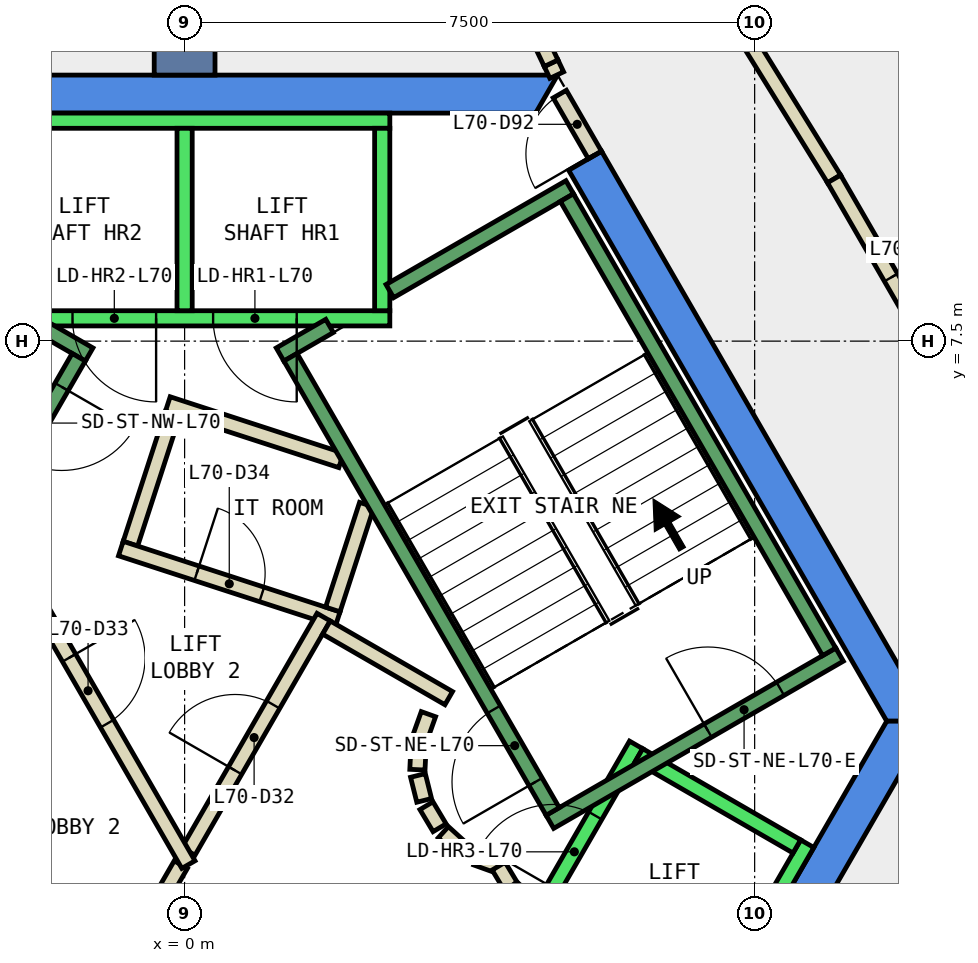
"""IFC4 building model, lengths in metres.
Left out: names, types, materials, properties, quantities, classifications, styles, units other than length and angle.
Written with IfcOpenShell. Run it as: python <this file> out.ifc"""

import sys

from ifc_helpers import new_model, si_unit, direction, frame, frame_2d, origin, place, context, subcontext, project, spatial, polyline, rectangle, outline, extrude, element, fill, save


model = new_model("IFC4")
c1 = context("Model", 3, precision=1e-05, world=origin(), true_north=direction((0.0, 1.0)))
c2 = subcontext(c1, "Body", "Model", "MODEL_VIEW")
j1 = project(units=[si_unit("LENGTHUNIT", "METRE"), si_unit("PLANEANGLEUNIT", "RADIAN")], contexts=[c1])
p1 = place(None, origin())
s1 = spatial("IfcSite", under=j1, at=p1, CompositionType="ELEMENT")
p2 = place(p1, origin())
s2 = spatial("IfcBuilding", under=s1, at=p2, CompositionType="ELEMENT")
p3 = place(p2, frame((0.0, 0.0, 300.8)))
s3 = spatial("IfcBuildingStorey", under=s2, at=p3, CompositionType="ELEMENT", Elevation=300.8)
p4 = place(p3, frame((0.0, 0.0, -0.34)))
e1 = element("IfcWall", 1, at=p4, inside=s3, PredefinedType="SHEAR", context=c2, shape_type="SweptSolid", body=[
    extrude(outline(polyline([(5.486, 9.998), (5.053, 9.748), (9.238, 2.5), (9.815, 2.5), (5.486, 9.998)])), origin(), (0.0, 0.0, 1.0), 3.6),
])
p5 = place(p3, frame((0.0, 0.0, -0.34)))
e2 = element("IfcWall", 2, at=p5, inside=s3, PredefinedType="SHEAR", context=c2, shape_type="SweptSolid", body=[
    extrude(outline(polyline([(4.907, 11.0), (-4.907, 11.0), (-4.619, 10.5), (4.619, 10.5), (4.907, 11.0)])), origin(), (0.0, 0.0, 1.0), 3.6),
])
p6 = place(p3, frame((0.0, 0.0, -0.34)))
e3 = element("IfcWall", 3, at=p6, inside=s3, PredefinedType="SHEAR", context=c2, shape_type="SweptSolid", body=[
    extrude(outline(polyline([(4.907, -6.0), (9.815, 2.5), (9.238, 2.5), (4.619, -5.5), (4.907, -6.0)])), origin(), (0.0, 0.0, 1.0), 3.6),
])
p7 = place(p3, frame((0.0, 11.0, -0.34), z_axis=(0.0, 0.0, 1.0), x_axis=(0.0, 1.0, 0.0)))
e4 = element("IfcWall", 4, at=p7, inside=s3, PredefinedType="SHEAR", context=c2, shape_type="SweptSolid", body=[
    extrude(rectangle(XDim=9.0, YDim=0.8, at=frame_2d((4.5, 0.0))), origin(), (0.0, 0.0, 1.0), 3.6),
])
p8 = place(p3, frame((2.06, 5.931, 0.0), z_axis=(0.0, 0.0, 1.0), x_axis=(-0.95092855133, 0.309410552932, 0.0)))
e5 = element("IfcWall", 5, at=p8, inside=s3, PredefinedType="PARTITIONING", context=c2, shape_type="SweptSolid", body=[
    extrude(rectangle(XDim=2.399, YDim=0.2, at=frame_2d((1.199, 0.0))), origin(), (0.0, 0.0, 1.0), 3.26),
])
p9 = place(p3, frame((-0.157, 6.547, 0.0), z_axis=(0.0, 0.0, 1.0), x_axis=(-0.308813127339, -0.951122732555, 0.0)))
e6 = element("IfcWall", 6, at=p9, inside=s3, PredefinedType="PARTITIONING", context=c2, shape_type="SweptSolid", body=[
    extrude(rectangle(XDim=1.8, YDim=0.2, at=frame_2d((0.9, 0.0))), origin(), (0.0, 0.0, 1.0), 3.26),
])
p10 = place(p3, frame((-0.839, 4.771, 0.0), z_axis=(0.0, 0.0, 1.0), x_axis=(0.950961084355, -0.309310549515, 0.0)))
e7 = element("IfcWall", 7, at=p10, inside=s3, PredefinedType="PARTITIONING", context=c2, shape_type="SweptSolid", body=[
    extrude(rectangle(XDim=3.0, YDim=0.2, at=frame_2d((1.5, 0.0))), origin(), (0.0, 0.0, 1.0), 3.26),
])
p11 = place(p10, frame((1.05, 0.0, 0.0)))
e8 = element("IfcOpeningElement", 8, at=p11, cuts=e7, PredefinedType="OPENING", context=c2, shape_type="SweptSolid", body=[
    extrude(rectangle(XDim=0.9, YDim=2.1, at=frame_2d((0.45, 1.05))), frame((0.0, 0.11, 0.0), z_axis=(0.0, -1.0, 0.0), x_axis=(1.0, 0.0, 0.0)), (0.0, 0.0, 1.0), 0.22),
])
p12 = place(p3, frame((1.95, 3.97, 0.0), z_axis=(0.0, 0.0, 1.0), x_axis=(0.308583003896, 0.951197418892, 0.0)))
e9 = element("IfcWall", 9, at=p12, inside=s3, PredefinedType="PARTITIONING", context=c2, shape_type="SweptSolid", body=[
    extrude(rectangle(XDim=1.449, YDim=0.2, at=frame_2d((0.724, 0.0))), origin(), (0.0, 0.0, 1.0), 3.26),
])
p13 = place(p3, frame((4.896, 11.0, 0.0), z_axis=(0.0, 0.0, 1.0), x_axis=(-0.428451014387, 0.903565010539, 0.0)))
e10 = element("IfcWall", 10, at=p13, inside=s3, PredefinedType="PARTITIONING", context=c2, shape_type="SweptSolid", body=[
    extrude(rectangle(XDim=0.173, YDim=0.2, at=frame_2d((0.086, 0.0))), origin(), (0.0, 0.0, 1.0), 2.4),
])
p14 = place(p3, frame((6.683, 12.642, 0.0), z_axis=(0.0, 0.0, 1.0), x_axis=(0.526290465295, -0.850304854825, 0.0)))
e11 = element("IfcWall", 11, at=p14, inside=s3, PredefinedType="PARTITIONING", context=c2, shape_type="SweptSolid", body=[
    extrude(rectangle(XDim=3.538, YDim=0.2, at=frame_2d((1.769, 0.0))), origin(), (0.0, 0.0, 1.0), 3.26),
])
p15 = place(p3, frame((8.545, 9.634, 0.0), z_axis=(0.0, 0.0, 1.0), x_axis=(0.50008212199, -0.86597798544, 0.0)))
e12 = element("IfcWall", 12, at=p15, inside=s3, PredefinedType="PARTITIONING", context=c2, shape_type="SweptSolid", body=[
    extrude(rectangle(XDim=3.995, YDim=0.2, at=frame_2d((1.998, 0.0))), origin(), (0.0, 0.0, 1.0), 3.26),
])
p16 = place(p15, frame((1.498, 0.0, 0.0)))
e13 = element("IfcOpeningElement", 13, at=p16, cuts=e12, PredefinedType="OPENING", context=c2, shape_type="SweptSolid", body=[
    extrude(rectangle(XDim=1.0, YDim=2.1, at=frame_2d((0.5, 1.05))), frame((0.0, 0.11, 0.0), z_axis=(0.0, -1.0, 0.0), x_axis=(1.0, 0.0, 0.0)), (0.0, 0.0, 1.0), 0.22),
])
p17 = place(p3, frame((-0.982, -1.0, 0.0), z_axis=(0.0, 0.0, 1.0), x_axis=(0.50024047865, 0.865886518847, 0.0)))
e14 = element("IfcWall", 14, at=p17, inside=s3, PredefinedType="PARTITIONING", context=c2, shape_type="SweptSolid", body=[
    extrude(rectangle(XDim=1.863, YDim=0.2, at=frame_2d((0.931, 0.0))), origin(), (0.0, 0.0, 1.0), 3.26),
])
p18 = place(p3, frame((0.05, 0.787, 0.0), z_axis=(0.0, 0.0, 1.0), x_axis=(0.499954076797, 0.866051915934, 0.0)))
e15 = element("IfcWall", 15, at=p18, inside=s3, PredefinedType="PARTITIONING", context=c2, shape_type="SweptSolid", body=[
    extrude(rectangle(XDim=3.558, YDim=0.2, at=frame_2d((1.779, 0.0))), origin(), (0.0, 0.0, 1.0), 3.26),
])
p19 = place(p18, frame((1.229, 0.0, 0.0)))
e16 = element("IfcOpeningElement", 16, at=p19, cuts=e15, PredefinedType="OPENING", context=c2, shape_type="SweptSolid", body=[
    extrude(rectangle(XDim=1.0, YDim=2.1, at=frame_2d((0.5, 1.05))), frame((0.0, 0.11, 0.0), z_axis=(0.0, -1.0, 0.0), x_axis=(1.0, 0.0, 0.0)), (0.0, 0.0, 1.0), 0.22),
])
p20 = place(p3, frame((1.866, 3.732, 0.0), z_axis=(0.0, 0.0, 1.0), x_axis=(0.866043361281, -0.499968895414, 0.0)))
e17 = element("IfcWall", 17, at=p20, inside=s3, PredefinedType="PARTITIONING", context=c2, shape_type="SweptSolid", body=[
    extrude(rectangle(XDim=1.858, YDim=0.2, at=frame_2d((0.929, 0.0))), origin(), (0.0, 0.0, 1.0), 3.26),
])
p21 = place(p3, frame((3.208, 2.592, 0.0), z_axis=(0.0, 0.0, 1.0), x_axis=(-0.337388820924, -0.941365382578, 0.0)))
e18 = element("IfcWall", 18, at=p21, inside=s3, PredefinedType="PARTITIONING", context=c2, shape_type="SweptSolid", body=[
    extrude(rectangle(XDim=0.338, YDim=0.2, at=frame_2d((0.169, 0.0))), origin(), (0.0, 0.0, 1.0), 3.26),
])
p22 = place(p3, frame((3.079, 2.199, 0.0), z_axis=(0.0, 0.0, 1.0), x_axis=(-0.047771483479, -0.998858290933, 0.0)))
e19 = element("IfcWall", 19, at=p22, inside=s3, PredefinedType="PARTITIONING", context=c2, shape_type="SweptSolid", body=[
    extrude(rectangle(XDim=0.337, YDim=0.2, at=frame_2d((0.169, 0.0))), origin(), (0.0, 0.0, 1.0), 3.26),
])
p23 = place(p3, frame((3.07, 1.786, 0.0), z_axis=(0.0, 0.0, 1.0), x_axis=(0.242705583207, -0.970099994784, 0.0)))
e20 = element("IfcWall", 20, at=p23, inside=s3, PredefinedType="PARTITIONING", context=c2, shape_type="SweptSolid", body=[
    extrude(rectangle(XDim=0.338, YDim=0.2, at=frame_2d((0.169, 0.0))), origin(), (0.0, 0.0, 1.0), 3.26),
])
for number, where, z_axis, x_axis in (
    (21, (3.182, 1.388, 0.0), (0.0, 0.0, 1.0), (0.512, -0.859, 0.0)),
    (22, (3.404, 1.039, 0.0), (0.0, 0.0, 1.0), (0.74, -0.672, 0.0)),
):
    element("IfcWall", number, at=place(p3, frame(where, z_axis=z_axis, x_axis=x_axis)), inside=s3, PredefinedType="PARTITIONING", context=c2, shape_type="SweptSolid", body=[
        extrude(rectangle(XDim=0.338, YDim=0.2, at=frame_2d((0.169, 0.0))), origin(), (0.0, 0.0, 1.0), 3.26),
    ])
p24 = place(p3, frame((3.838, 0.702, 0.0), z_axis=(0.0, 0.0, 1.0), x_axis=(0.941035081519, -0.338308993895, 0.0)))
e23 = element("IfcWall", 23, at=p24, inside=s3, PredefinedType="PARTITIONING", context=c2, shape_type="SweptSolid", body=[
    extrude(rectangle(XDim=0.337, YDim=0.2, at=frame_2d((0.168, 0.0))), origin(), (0.0, 0.0, 1.0), 3.26),
])
p25 = place(p3, frame((4.132, 0.593, 0.0), z_axis=(0.0, 0.0, 1.0), x_axis=(0.513561617048, -0.858052717201, 0.0)))
e24 = element("IfcWall", 24, at=p25, inside=s3, PredefinedType="PARTITIONING", context=c2, shape_type="SweptSolid", body=[
    extrude(rectangle(XDim=0.308, YDim=0.2, at=frame_2d((0.154, 0.0))), origin(), (0.0, 0.0, 1.0), 3.26),
])
p26 = place(p3, frame((4.301, 0.315, 0.0), z_axis=(0.0, 0.0, 1.0), x_axis=(0.741798017506, -0.670623367639, 0.0)))
e25 = element("IfcWall", 25, at=p26, inside=s3, PredefinedType="PARTITIONING", context=c2, shape_type="SweptSolid", body=[
    extrude(rectangle(XDim=0.309, YDim=0.2, at=frame_2d((0.154, 0.0))), origin(), (0.0, 0.0, 1.0), 3.26),
])
p27 = place(p3, frame((-2.54, 5.1, 0.0), z_axis=(0.0, 0.0, 1.0), x_axis=(0.499925051871, -0.866068670783, 0.0)))
e26 = element("IfcWall", 26, at=p27, inside=s3, PredefinedType="PARTITIONING", context=c2, shape_type="SweptSolid", body=[
    extrude(rectangle(XDim=5.181, YDim=0.2, at=frame_2d((2.59, 0.0))), origin(), (0.0, 0.0, 1.0), 3.26),
])
p28 = place(p27, frame((2.04, 0.0, 0.0)))
e27 = element("IfcOpeningElement", 27, at=p28, cuts=e26, PredefinedType="OPENING", context=c2, shape_type="SweptSolid", body=[
    extrude(rectangle(XDim=1.0, YDim=2.1, at=frame_2d((0.5, 1.05))), frame((0.0, 0.11, 0.0), z_axis=(0.0, -1.0, 0.0), x_axis=(1.0, 0.0, 0.0)), (0.0, 0.0, 1.0), 0.22),
])
p29 = place(p3, frame((5.399, 9.948, 0.0), z_axis=(0.0, 0.0, 1.0), x_axis=(-0.499882215713, 0.866093395895, 0.0)))
e28 = element("IfcWall", 28, at=p29, inside=s3, PredefinedType="PARTITIONING", context=c2, shape_type="SweptSolid", body=[
    extrude(rectangle(XDim=0.926, YDim=0.2, at=frame_2d((0.463, 0.0))), origin(), (0.0, 0.0, 1.0), 2.4),
])
p30 = place(p29, frame((0.017, 0.0, 0.0)))
e29 = element("IfcOpeningElement", 29, at=p30, cuts=e28, PredefinedType="OPENING", context=c2, shape_type="SweptSolid", body=[
    extrude(rectangle(XDim=0.9, YDim=2.1, at=frame_2d((0.45, 1.05))), frame((0.0, 0.11, 0.0), z_axis=(0.0, -1.0, 0.0), x_axis=(1.0, 0.0, 0.0)), (0.0, 0.0, 1.0), 0.22),
])
p31 = place(p3, frame((4.822, 11.156, 0.0), z_axis=(0.0, 0.0, 1.0), x_axis=(-0.429057973289, 0.903276953961, 0.0)))
e30 = element("IfcWall", 30, at=p31, inside=s3, PredefinedType="PARTITIONING", context=c2, shape_type="SweptSolid", body=[
    extrude(rectangle(XDim=4.298, YDim=0.2, at=frame_2d((2.149, 0.0))), origin(), (0.0, 0.0, 1.0), 3.26),
])
p32 = place(p3, frame((2.7, 7.8, 0.0), z_axis=(0.0, 0.0, 1.0), x_axis=(-1.0, 0.0, 0.0)))
e31 = element("IfcWall", 31, at=p32, inside=s3, PredefinedType="STANDARD", context=c2, shape_type="SweptSolid", body=[
    extrude(rectangle(XDim=5.4, YDim=0.2, at=frame_2d((2.7, 0.0))), origin(), (0.0, 0.0, 1.0), 3.26),
])
p33 = place(p32, frame((1.225, 0.0, 0.0)))
e32 = element("IfcOpeningElement", 32, at=p33, cuts=e31, PredefinedType="OPENING", context=c2, shape_type="SweptSolid", body=[
    extrude(rectangle(XDim=1.1, YDim=2.1, at=frame_2d((0.55, 1.05))), frame((0.0, 0.11, 0.0), z_axis=(0.0, -1.0, 0.0), x_axis=(1.0, 0.0, 0.0)), (0.0, 0.0, 1.0), 0.22),
])
p34 = place(p32, frame((3.075, 0.0, 0.0)))
e33 = element("IfcOpeningElement", 33, at=p34, cuts=e31, PredefinedType="OPENING", context=c2, shape_type="SweptSolid", body=[
    extrude(rectangle(XDim=1.1, YDim=2.1, at=frame_2d((0.55, 1.05))), frame((0.0, 0.11, 0.0), z_axis=(0.0, -1.0, 0.0), x_axis=(1.0, 0.0, 0.0)), (0.0, 0.0, 1.0), 0.22),
])
p35 = place(p3, frame((2.7, 10.4, 0.0), z_axis=(0.0, 0.0, 1.0), x_axis=(-1.0, 0.0, 0.0)))
e34 = element("IfcWall", 34, at=p35, inside=s3, PredefinedType="STANDARD", context=c2, shape_type="SweptSolid", body=[
    extrude(rectangle(XDim=5.4, YDim=0.2, at=frame_2d((2.7, 0.0))), origin(), (0.0, 0.0, 1.0), 3.26),
])
for number, where, z_axis, x_axis in (
    (35, (2.6, 7.9, 0.0), (0.0, 0.0, 1.0), (0.0, 1.0, 0.0)),
    (36, (0.0, 7.9, 0.0), (0.0, 0.0, 1.0), (0.0, 1.0, 0.0)),
):
    element("IfcWall", number, at=place(p3, frame(where, z_axis=z_axis, x_axis=x_axis)), inside=s3, PredefinedType="STANDARD", context=c2, shape_type="SweptSolid", body=[
        extrude(rectangle(XDim=2.4, YDim=0.2, at=frame_2d((1.2, 0.0))), origin(), (0.0, 0.0, 1.0), 3.26),
    ])
p36 = place(p3, frame((3.24, -2.488, 0.0), z_axis=(0.0, 0.0, 1.0), x_axis=(0.500034260056, 0.866005622828, 0.0)))
e37 = element("IfcWall", 37, at=p36, inside=s3, PredefinedType="STANDARD", context=c2, shape_type="SweptSolid", body=[
    extrude(rectangle(XDim=5.399, YDim=0.2, at=frame_2d((2.7, 0.0))), origin(), (0.0, 0.0, 1.0), 3.26),
])
p37 = place(p36, frame((3.225, 0.0, 0.0)))
e38 = element("IfcOpeningElement", 38, at=p37, cuts=e37, PredefinedType="OPENING", context=c2, shape_type="SweptSolid", body=[
    extrude(rectangle(XDim=1.1, YDim=2.1, at=frame_2d((0.55, 1.05))), frame((0.0, 0.11, 0.0), z_axis=(0.0, -1.0, 0.0), x_axis=(1.0, 0.0, 0.0)), (0.0, 0.0, 1.0), 0.22),
])
p38 = place(p36, frame((1.225, 0.0, 0.0)))
e39 = element("IfcOpeningElement", 39, at=p38, cuts=e37, PredefinedType="OPENING", context=c2, shape_type="SweptSolid", body=[
    extrude(rectangle(XDim=1.1, YDim=2.1, at=frame_2d((0.55, 1.05))), frame((0.0, 0.11, 0.0), z_axis=(0.0, -1.0, 0.0), x_axis=(1.0, 0.0, 0.0)), (0.0, 0.0, 1.0), 0.22),
])
p39 = place(p3, frame((5.492, -3.788, 0.0), z_axis=(0.0, 0.0, 1.0), x_axis=(0.500034260056, 0.866005622828, 0.0)))
e40 = element("IfcWall", 40, at=p39, inside=s3, PredefinedType="STANDARD", context=c2, shape_type="SweptSolid", body=[
    extrude(rectangle(XDim=5.399, YDim=0.2, at=frame_2d((2.7, 0.0))), origin(), (0.0, 0.0, 1.0), 3.26),
])
p40 = place(p3, frame((5.977, 2.052, 0.0), z_axis=(0.0, 0.0, 1.0), x_axis=(0.865973769406, -0.500089422704, 0.0)))
e41 = element("IfcWall", 41, at=p40, inside=s3, PredefinedType="STANDARD", context=c2, shape_type="SweptSolid", body=[
    extrude(rectangle(XDim=2.399, YDim=0.2, at=frame_2d((1.2, 0.0))), origin(), (0.0, 0.0, 1.0), 3.26),
])
p41 = place(p3, frame((4.806, 1.176, 0.0), z_axis=(0.0, 0.0, 1.0), x_axis=(0.866059941101, 0.499940174841, 0.0)))
e42 = element("IfcWall", 42, at=p41, inside=s3, PredefinedType="STANDARD", context=c2, shape_type="SweptSolid", body=[
    extrude(rectangle(XDim=4.4, YDim=0.2, at=frame_2d((2.2, 0.0))), origin(), (0.0, 0.0, 1.0), 3.26),
])
p42 = place(p41, frame((2.4, 0.0, 0.0)))
e43 = element("IfcOpeningElement", 43, at=p42, cuts=e42, PredefinedType="OPENING", context=c2, shape_type="SweptSolid", body=[
    extrude(rectangle(XDim=1.1, YDim=2.2, at=frame_2d((0.55, 1.1))), frame((0.0, 0.11, 0.0), z_axis=(0.0, -1.0, 0.0), x_axis=(1.0, 0.0, 0.0)), (0.0, 0.0, 1.0), 0.22),
])
p43 = place(p3, frame((2.7, 8.158, 0.0), z_axis=(0.0, 0.0, 1.0), x_axis=(0.86611865017, 0.499838457731, 0.0)))
e44 = element("IfcWall", 44, at=p43, inside=s3, PredefinedType="STANDARD", context=c2, shape_type="SweptSolid", body=[
    extrude(rectangle(XDim=2.733, YDim=0.2, at=frame_2d((1.366, 0.0))), origin(), (0.0, 0.0, 1.0), 3.26),
])
p44 = place(p3, frame((1.256, 7.324, 0.0), z_axis=(0.0, 0.0, 1.0), x_axis=(0.865915093549, 0.500191014278, 0.0)))
e45 = element("IfcWall", 45, at=p44, inside=s3, PredefinedType="STANDARD", context=c2, shape_type="SweptSolid", body=[
    extrude(rectangle(XDim=0.752, YDim=0.2, at=frame_2d((0.376, 0.0))), origin(), (0.0, 0.0, 1.0), 3.26),
])
p45 = place(p3, frame((4.843, 1.312, 0.0), z_axis=(0.0, 0.0, 1.0), x_axis=(-0.499963383562, 0.866046543262, 0.0)))
e46 = element("IfcWall", 46, at=p45, inside=s3, PredefinedType="STANDARD", context=c2, shape_type="SweptSolid", body=[
    extrude(rectangle(XDim=6.9, YDim=0.2, at=frame_2d((3.45, 0.0))), origin(), (0.0, 0.0, 1.0), 3.26),
])
p46 = place(p45, frame((0.45, 0.0, 0.0)))
e47 = element("IfcOpeningElement", 47, at=p46, cuts=e46, PredefinedType="OPENING", context=c2, shape_type="SweptSolid", body=[
    extrude(rectangle(XDim=1.1, YDim=2.2, at=frame_2d((0.55, 1.1))), frame((0.0, 0.11, 0.0), z_axis=(0.0, -1.0, 0.0), x_axis=(1.0, 0.0, 0.0)), (0.0, 0.0, 1.0), 0.22),
])
p47 = place(p3, frame((8.48, 3.412, 0.0), z_axis=(0.0, 0.0, 1.0), x_axis=(-0.499978703459, 0.866037698999, 0.0)))
e48 = element("IfcWall", 48, at=p47, inside=s3, PredefinedType="STANDARD", context=c2, shape_type="SweptSolid", body=[
    extrude(rectangle(XDim=6.9, YDim=0.2, at=frame_2d((3.45, 0.0))), origin(), (0.0, 0.0, 1.0), 3.26),
])
p48 = place(p3, frame((-1.256, 7.324, 0.0), z_axis=(0.0, 0.0, 1.0), x_axis=(-0.866046073146, 0.499964197906, 0.0)))
e49 = element("IfcWall", 49, at=p48, inside=s3, PredefinedType="STANDARD", context=c2, shape_type="SweptSolid", body=[
    extrude(rectangle(XDim=4.4, YDim=0.2, at=frame_2d((2.2, 0.0))), origin(), (0.0, 0.0, 1.0), 3.26),
])
p49 = place(p48, frame((2.4, 0.0, 0.0)))
e50 = element("IfcOpeningElement", 50, at=p49, cuts=e49, PredefinedType="OPENING", context=c2, shape_type="SweptSolid", body=[
    extrude(rectangle(XDim=1.1, YDim=2.2, at=frame_2d((0.55, 1.1))), frame((0.0, 0.11, 0.0), z_axis=(0.0, -1.0, 0.0), x_axis=(1.0, 0.0, 0.0)), (0.0, 0.0, 1.0), 0.22),
])
p50 = place(p3, frame((-1.393, 7.288, 0.0), z_axis=(0.0, 0.0, 1.0), x_axis=(-0.499963383562, -0.866046543262, 0.0)))
e51 = element("IfcWall", 51, at=p50, inside=s3, PredefinedType="STANDARD", context=c2, shape_type="SweptSolid", body=[
    extrude(rectangle(XDim=6.9, YDim=0.2, at=frame_2d((3.45, 0.0))), origin(), (0.0, 0.0, 1.0), 3.26),
])
p51 = place(p50, frame((0.45, 0.0, 0.0)))
e52 = element("IfcOpeningElement", 52, at=p51, cuts=e51, PredefinedType="OPENING", context=c2, shape_type="SweptSolid", body=[
    extrude(rectangle(XDim=1.1, YDim=2.2, at=frame_2d((0.55, 1.1))), frame((0.0, 0.11, 0.0), z_axis=(0.0, -1.0, 0.0), x_axis=(1.0, 0.0, 0.0)), (0.0, 0.0, 1.0), 0.22),
])
p52 = place(p16, origin())
e53 = element("IfcDoor", 53, at=p52, inside=s3, OperationType="SINGLE_SWING_LEFT", PredefinedType="DOOR", context=c2, shape_type="SweptSolid", body=[
    extrude(rectangle(XDim=1.0, YDim=2.1, at=frame_2d((0.5, 1.05))), frame((0.0, 0.025, 0.0), z_axis=(0.0, -1.0, 0.0), x_axis=(1.0, 0.0, 0.0)), (0.0, 0.0, 1.0), 0.05),
])
fill(e13, e53)
p53 = place(p19, origin())
e54 = element("IfcDoor", 54, at=p53, inside=s3, OperationType="SINGLE_SWING_RIGHT", PredefinedType="DOOR", context=c2, shape_type="SweptSolid", body=[
    extrude(rectangle(XDim=1.0, YDim=2.1, at=frame_2d((0.5, 1.05))), frame((0.0, 0.025, 0.0), z_axis=(0.0, -1.0, 0.0), x_axis=(1.0, 0.0, 0.0)), (0.0, 0.0, 1.0), 0.05),
])
fill(e16, e54)
p54 = place(p28, origin())
e55 = element("IfcDoor", 55, at=p54, inside=s3, OperationType="SINGLE_SWING_RIGHT", PredefinedType="DOOR", context=c2, shape_type="SweptSolid", body=[
    extrude(rectangle(XDim=1.0, YDim=2.1, at=frame_2d((0.5, 1.05))), frame((0.0, 0.025, 0.0), z_axis=(0.0, -1.0, 0.0), x_axis=(1.0, 0.0, 0.0)), (0.0, 0.0, 1.0), 0.05),
])
fill(e27, e55)
p55 = place(p11, origin())
e56 = element("IfcDoor", 56, at=p55, inside=s3, OperationType="SINGLE_SWING_LEFT", PredefinedType="DOOR", context=c2, shape_type="SweptSolid", body=[
    extrude(rectangle(XDim=0.9, YDim=2.1, at=frame_2d((0.45, 1.05))), frame((0.0, 0.025, 0.0), z_axis=(0.0, -1.0, 0.0), x_axis=(1.0, 0.0, 0.0)), (0.0, 0.0, 1.0), 0.05),
])
fill(e8, e56)
p56 = place(p30, origin())
e57 = element("IfcDoor", 57, at=p56, inside=s3, OperationType="SINGLE_SWING_LEFT", PredefinedType="DOOR", context=c2, shape_type="SweptSolid", body=[
    extrude(rectangle(XDim=0.9, YDim=2.1, at=frame_2d((0.45, 1.05))), frame((0.0, 0.025, 0.0), z_axis=(0.0, -1.0, 0.0), x_axis=(1.0, 0.0, 0.0)), (0.0, 0.0, 1.0), 0.05),
])
fill(e29, e57)
p57 = place(p33, origin())
e58 = element("IfcDoor", 58, at=p57, inside=s3, OperationType="SLIDING_TO_LEFT", PredefinedType="DOOR", context=c2, shape_type="SweptSolid", body=[
    extrude(rectangle(XDim=1.1, YDim=2.1, at=frame_2d((0.55, 1.05))), frame((0.0, 0.025, 0.0), z_axis=(0.0, -1.0, 0.0), x_axis=(1.0, 0.0, 0.0)), (0.0, 0.0, 1.0), 0.05),
])
fill(e32, e58)
p58 = place(p34, origin())
e59 = element("IfcDoor", 59, at=p58, inside=s3, OperationType="SLIDING_TO_LEFT", PredefinedType="DOOR", context=c2, shape_type="SweptSolid", body=[
    extrude(rectangle(XDim=1.1, YDim=2.1, at=frame_2d((0.55, 1.05))), frame((0.0, 0.025, 0.0), z_axis=(0.0, -1.0, 0.0), x_axis=(1.0, 0.0, 0.0)), (0.0, 0.0, 1.0), 0.05),
])
fill(e33, e59)
p59 = place(p37, origin())
e60 = element("IfcDoor", 60, at=p59, inside=s3, OperationType="SLIDING_TO_LEFT", PredefinedType="DOOR", context=c2, shape_type="SweptSolid", body=[
    extrude(rectangle(XDim=1.1, YDim=2.1, at=frame_2d((0.55, 1.05))), frame((0.0, 0.025, 0.0), z_axis=(0.0, -1.0, 0.0), x_axis=(1.0, 0.0, 0.0)), (0.0, 0.0, 1.0), 0.05),
])
fill(e38, e60)
p60 = place(p46, origin())
e61 = element("IfcDoor", 61, at=p60, inside=s3, OperationType="SINGLE_SWING_LEFT", PredefinedType="DOOR", context=c2, shape_type="SweptSolid", body=[
    extrude(rectangle(XDim=1.1, YDim=2.2, at=frame_2d((0.55, 1.1))), frame((0.0, 0.025, 0.0), z_axis=(0.0, -1.0, 0.0), x_axis=(1.0, 0.0, 0.0)), (0.0, 0.0, 1.0), 0.05),
])
fill(e47, e61)
p61 = place(p42, origin())
e62 = element("IfcDoor", 62, at=p61, inside=s3, OperationType="SINGLE_SWING_LEFT", PredefinedType="DOOR", context=c2, shape_type="SweptSolid", body=[
    extrude(rectangle(XDim=1.1, YDim=2.2, at=frame_2d((0.55, 1.1))), frame((0.0, 0.025, 0.0), z_axis=(0.0, -1.0, 0.0), x_axis=(1.0, 0.0, 0.0)), (0.0, 0.0, 1.0), 0.05),
])
fill(e43, e62)
p62 = place(p51, origin())
e63 = element("IfcDoor", 63, at=p62, inside=s3, OperationType="SINGLE_SWING_LEFT", PredefinedType="DOOR", context=c2, shape_type="SweptSolid", body=[
    extrude(rectangle(XDim=1.1, YDim=2.2, at=frame_2d((0.55, 1.1))), frame((0.0, 0.025, 0.0), z_axis=(0.0, -1.0, 0.0), x_axis=(1.0, 0.0, 0.0)), (0.0, 0.0, 1.0), 0.05),
])
fill(e52, e63)
save(model, sys.argv[1])
